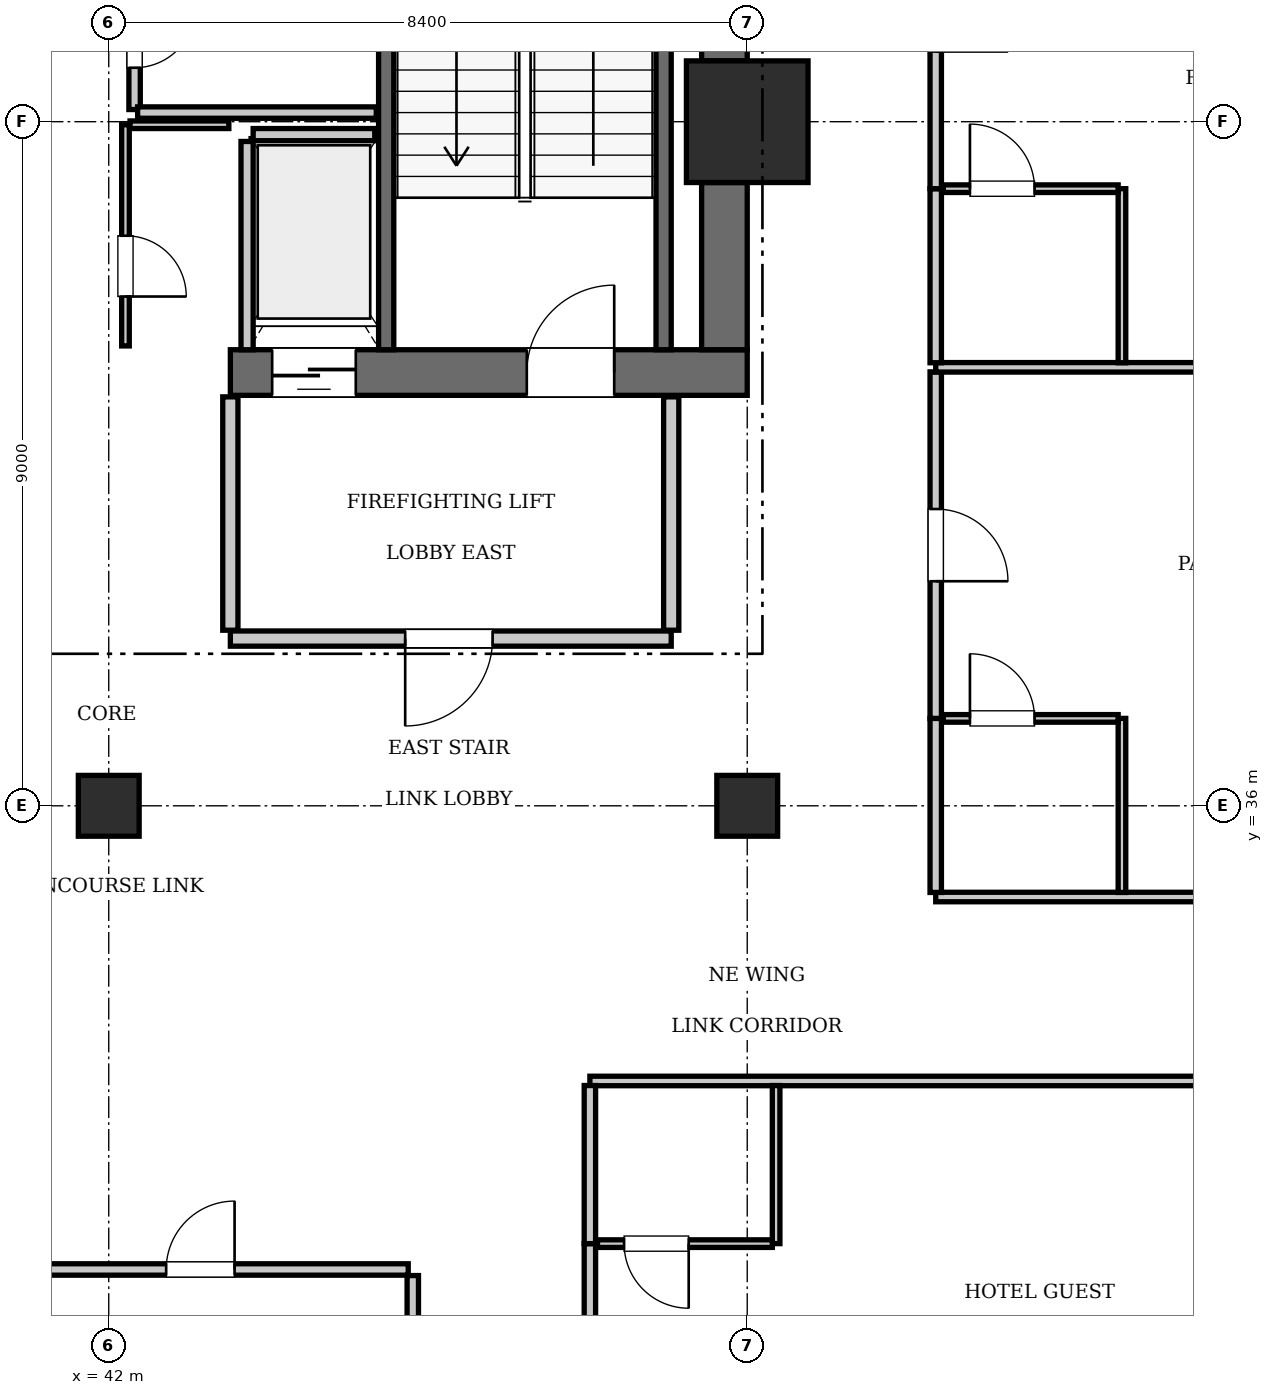
"""IFC4 building model, lengths in metres.
Left out: names, types, materials, properties, quantities, classifications, styles, units other than length and angle.
Written with IfcOpenShell. Run it as: python <this file> out.ifc"""

import sys

from ifc_helpers import new_model, si_unit, direction, frame, frame_2d, origin, origin_2d, place, context, subcontext, project, spatial, rectangle, extrude, element, fill, save


model = new_model("IFC4")
c1 = context("Model", 3, precision=1e-05, world=origin(), true_north=direction((0.0, 1.0)))
c2 = subcontext(c1, "Body", "Model", "MODEL_VIEW")
j1 = project(units=[si_unit("LENGTHUNIT", "METRE"), si_unit("PLANEANGLEUNIT", "RADIAN")], contexts=[c1])
p1 = place(None, origin())
s1 = spatial("IfcSite", under=j1, at=p1, CompositionType="ELEMENT")
p2 = place(p1, origin())
s2 = spatial("IfcBuilding", under=s1, at=p2, CompositionType="ELEMENT")
p3 = place(p2, frame((0.0, 0.0, 266.35)))
s3 = spatial("IfcBuildingStorey", under=s2, at=p3, CompositionType="ELEMENT", Elevation=266.35)
p4 = place(p3, frame((50.4, 45.0, 0.0), z_axis=(0.0, 0.0, 1.0), x_axis=(1.0, 0.0, 0.0)))
e1 = element("IfcColumn", 1, at=p4, inside=s3, PredefinedType="COLUMN", context=c2, shape_type="SweptSolid", body=[
    extrude(rectangle(XDim=1.6, YDim=1.6, at=origin_2d()), origin(), (0.0, 0.0, 1.0), 3.85),
])
p5 = place(p3, frame((43.6, 41.7, 0.0), z_axis=(0.0, 0.0, 1.0), x_axis=(1.0, 0.0, 0.0)))
e2 = element("IfcWall", 2, at=p5, inside=s3, PredefinedType="SHEAR", context=c2, shape_type="SweptSolid", body=[
    extrude(rectangle(XDim=6.8, YDim=0.6, at=frame_2d((3.4, 0.0))), origin(), (0.0, 0.0, 1.0), 3.85),
])
p6 = place(p5, frame((3.9, 0.0, 0.0)))
e3 = element("IfcOpeningElement", 3, at=p6, cuts=e2, PredefinedType="OPENING", context=c2, shape_type="SweptSolid", body=[
    extrude(rectangle(XDim=1.15, YDim=2.15, at=frame_2d((0.575, 1.075))), frame((0.0, 0.31, 0.0), z_axis=(0.0, -1.0, 0.0), x_axis=(1.0, 0.0, 0.0)), (0.0, 0.0, 1.0), 0.62),
])
p7 = place(p5, frame((0.55, 0.0, 0.0)))
e4 = element("IfcOpeningElement", 4, at=p7, cuts=e2, PredefinedType="OPENING", context=c2, shape_type="SweptSolid", body=[
    extrude(rectangle(XDim=1.1, YDim=2.2, at=frame_2d((0.55, 1.1))), frame((0.0, 0.31, 0.0), z_axis=(0.0, -1.0, 0.0), x_axis=(1.0, 0.0, 0.0)), (0.0, 0.0, 1.0), 0.62),
])
p8 = place(p3, frame((50.1, 42.0, 0.0), z_axis=(0.0, 0.0, 1.0), x_axis=(0.0, 1.0, 0.0)))
e5 = element("IfcWall", 5, at=p8, inside=s3, PredefinedType="SHEAR", context=c2, shape_type="SweptSolid", body=[
    extrude(rectangle(XDim=2.2, YDim=0.6, at=frame_2d((1.1, 0.0))), origin(), (0.0, 0.0, 1.0), 3.85),
])
p9 = place(p3, frame((50.1, 45.8, 0.0), z_axis=(0.0, 0.0, 1.0), x_axis=(0.0, 1.0, 0.0)))
e6 = element("IfcWall", 6, at=p9, inside=s3, PredefinedType="SHEAR", context=c2, shape_type="SweptSolid", body=[
    extrude(rectangle(XDim=7.6, YDim=0.6, at=frame_2d((3.8, 0.0))), origin(), (0.0, 0.0, 1.0), 3.85),
])
for number, where, z_axis, x_axis in (
    (7, (42.0, 36.0, 0.0), (0.0, 0.0, 1.0), (1.0, 0.0, 0.0)),
    (8, (50.4, 36.0, 0.0), (0.0, 0.0, 1.0), (1.0, 0.0, 0.0)),
):
    element("IfcColumn", number, at=place(p3, frame(where, z_axis=z_axis, x_axis=x_axis)), inside=s3, PredefinedType="COLUMN", context=c2, shape_type="SweptSolid", body=[
        extrude(rectangle(XDim=0.8, YDim=0.8, at=origin_2d()), origin(), (0.0, 0.0, 1.0), 3.85),
    ])
p10 = place(p3, frame((45.65, 42.0, 0.0), z_axis=(0.0, 0.0, 1.0), x_axis=(0.0, 1.0, 0.0)))
e9 = element("IfcWall", 9, at=p10, inside=s3, PredefinedType="SOLIDWALL", context=c2, shape_type="SweptSolid", body=[
    extrude(rectangle(XDim=9.15, YDim=0.2, at=frame_2d((4.575, 0.0))), origin(), (0.0, 0.0, 1.0), 3.61),
])
p11 = place(p3, frame((49.3, 42.0, 0.0), z_axis=(0.0, 0.0, 1.0), x_axis=(0.0, 1.0, 0.0)))
e10 = element("IfcWall", 10, at=p11, inside=s3, PredefinedType="SOLIDWALL", context=c2, shape_type="SweptSolid", body=[
    extrude(rectangle(XDim=9.12, YDim=0.2, at=frame_2d((4.56, 0.0))), origin(), (0.0, 0.0, 1.0), 3.61),
])
p12 = place(p3, frame((43.9, 44.83, 0.0), z_axis=(0.0, 0.0, 1.0), x_axis=(1.0, 0.0, 0.0)))
e11 = element("IfcWall", 11, at=p12, inside=s3, PredefinedType="SOLIDWALL", context=c2, shape_type="SweptSolid", body=[
    extrude(rectangle(XDim=1.6, YDim=0.16, at=frame_2d((0.8, 0.0))), origin(), (0.0, 0.0, 1.0), 3.61),
])
p13 = place(p3, frame((43.82, 42.0, 0.0), z_axis=(0.0, 0.0, 1.0), x_axis=(0.0, 1.0, 0.0)))
e12 = element("IfcWall", 12, at=p13, inside=s3, PredefinedType="SOLIDWALL", context=c2, shape_type="SweptSolid", body=[
    extrude(rectangle(XDim=2.74, YDim=0.16, at=frame_2d((1.37, 0.0))), origin(), (0.0, 0.0, 1.0), 3.61),
])
p14 = place(p3, frame((43.6, 38.2, 0.0), z_axis=(0.0, 0.0, 1.0), x_axis=(1.0, 0.0, 0.0)))
e13 = element("IfcWall", 13, at=p14, inside=s3, PredefinedType="PARTITIONING", context=c2, shape_type="SweptSolid", body=[
    extrude(rectangle(XDim=5.8, YDim=0.2, at=frame_2d((2.9, 0.0))), origin(), (0.0, 0.0, 1.0), 3.61),
])
p15 = place(p14, frame((2.3, 0.0, 0.0)))
e14 = element("IfcOpeningElement", 14, at=p15, cuts=e13, PredefinedType="OPENING", context=c2, shape_type="SweptSolid", body=[
    extrude(rectangle(XDim=1.15, YDim=2.15, at=frame_2d((0.575, 1.075))), frame((0.0, 0.11, 0.0), z_axis=(0.0, -1.0, 0.0), x_axis=(1.0, 0.0, 0.0)), (0.0, 0.0, 1.0), 0.22),
])
for number, where, z_axis, x_axis in (
    (15, (43.6, 38.31, 0.0), (0.0, 0.0, 1.0), (0.0, 1.0, 0.0)),
    (16, (49.4, 38.31, 0.0), (0.0, 0.0, 1.0), (0.0, 1.0, 0.0)),
):
    element("IfcWall", number, at=place(p3, frame(where, z_axis=z_axis, x_axis=x_axis)), inside=s3, PredefinedType="PARTITIONING", context=c2, shape_type="SweptSolid", body=[
        extrude(rectangle(XDim=3.07, YDim=0.2, at=frame_2d((1.535, 0.0))), origin(), (0.0, 0.0, 1.0), 3.61),
    ])
p16 = place(p3, frame((42.22, 42.05, 0.0), z_axis=(0.0, 0.0, 1.0), x_axis=(0.0, 1.0, 0.0)))
e17 = element("IfcWall", 17, at=p16, inside=s3, PredefinedType="PARTITIONING", context=c2, shape_type="SweptSolid", body=[
    extrude(rectangle(XDim=2.91, YDim=0.1, at=frame_2d((1.455, 0.0))), origin(), (0.0, 0.0, 1.0), 3.61),
])
p17 = place(p16, frame((0.65, 0.0, 0.0)))
e18 = element("IfcOpeningElement", 18, at=p17, cuts=e17, PredefinedType="OPENING", context=c2, shape_type="SweptSolid", body=[
    extrude(rectangle(XDim=0.8, YDim=2.05, at=frame_2d((0.4, 1.025))), frame((0.0, 0.06, 0.0), z_axis=(0.0, -1.0, 0.0), x_axis=(1.0, 0.0, 0.0)), (0.0, 0.0, 1.0), 0.12),
])
p18 = place(p3, frame((42.28, 44.96, 0.0), z_axis=(0.0, 0.0, 1.0), x_axis=(1.0, 0.0, 0.0)))
e19 = element("IfcWall", 19, at=p18, inside=s3, PredefinedType="PARTITIONING", context=c2, shape_type="SweptSolid", body=[
    extrude(rectangle(XDim=1.3, YDim=0.1, at=frame_2d((0.65, 0.0))), origin(), (0.0, 0.0, 1.0), 3.61),
])
p19 = place(p3, frame((42.34, 45.16, 0.0), z_axis=(0.0, 0.0, 1.0), x_axis=(0.0, 1.0, 0.0)))
e20 = element("IfcWall", 20, at=p19, inside=s3, PredefinedType="PARTITIONING", context=c2, shape_type="SweptSolid", body=[
    extrude(rectangle(XDim=2.38, YDim=0.15, at=frame_2d((1.19, 0.0))), origin(), (0.0, 0.0, 1.0), 3.61),
])
p20 = place(p19, frame((0.55, 0.0, 0.0)))
e21 = element("IfcOpeningElement", 21, at=p20, cuts=e20, PredefinedType="OPENING", context=c2, shape_type="SweptSolid", body=[
    extrude(rectangle(XDim=0.8, YDim=2.05, at=frame_2d((0.4, 1.025))), frame((0.0, 0.085, 0.0), z_axis=(0.0, -1.0, 0.0), x_axis=(1.0, 0.0, 0.0)), (0.0, 0.0, 1.0), 0.17),
])
p21 = place(p3, frame((42.38, 45.12, 0.0), z_axis=(0.0, 0.0, 1.0), x_axis=(1.0, 0.0, 0.0)))
e22 = element("IfcWall", 22, at=p21, inside=s3, PredefinedType="PARTITIONING", context=c2, shape_type="SweptSolid", body=[
    extrude(rectangle(XDim=3.14, YDim=0.15, at=frame_2d((1.57, 0.0))), origin(), (0.0, 0.0, 1.0), 3.61),
])
p22 = place(p3, frame((46.0, 20.53, 0.0), z_axis=(0.0, 0.0, 1.0), x_axis=(0.0, 1.0, 0.0)))
e23 = element("IfcWall", 23, at=p22, inside=s3, PredefinedType="PARTITIONING", context=c2, shape_type="SweptSolid", body=[
    extrude(rectangle(XDim=9.29, YDim=0.15, at=frame_2d((4.645, 0.0))), origin(), (0.0, 0.0, 1.0), 3.61),
])
p23 = place(p3, frame((40.471, 29.9, 0.0), z_axis=(0.0, 0.0, 1.0), x_axis=(1.0, 0.0, 0.0)))
e24 = element("IfcWall", 24, at=p23, inside=s3, PredefinedType="PARTITIONING", context=c2, shape_type="SweptSolid", body=[
    extrude(rectangle(XDim=5.469, YDim=0.15, at=frame_2d((2.734, 0.0))), origin(), (0.0, 0.0, 1.0), 3.61),
])
p24 = place(p23, frame((2.284, 0.0, 0.0)))
e25 = element("IfcOpeningElement", 25, at=p24, cuts=e24, PredefinedType="OPENING", context=c2, shape_type="SweptSolid", body=[
    extrude(rectangle(XDim=0.9, YDim=2.1, at=frame_2d((0.45, 1.05))), frame((0.0, 0.085, 0.0), z_axis=(0.0, -1.0, 0.0), x_axis=(1.0, 0.0, 0.0)), (0.0, 0.0, 1.0), 0.17),
])
p25 = place(p3, frame((48.33, 32.38, 0.0), z_axis=(0.0, 0.0, 1.0), x_axis=(1.0, 0.0, 0.0)))
e26 = element("IfcWall", 26, at=p25, inside=s3, PredefinedType="PARTITIONING", context=c2, shape_type="SweptSolid", body=[
    extrude(rectangle(XDim=11.77, YDim=0.125, at=frame_2d((5.885, 0.0))), origin(), (0.0, 0.0, 1.0), 3.61),
])
p26 = place(p3, frame((48.33, 26.5, 0.0), z_axis=(0.0, 0.0, 1.0), x_axis=(0.0, 1.0, 0.0)))
e27 = element("IfcWall", 27, at=p26, inside=s3, PredefinedType="PARTITIONING", context=c2, shape_type="SweptSolid", body=[
    extrude(rectangle(XDim=3.74, YDim=0.15, at=frame_2d((1.87, 0.0))), origin(), (0.0, 0.0, 1.0), 3.61),
])
p27 = place(p26, frame((1.635, 0.0, 0.0)))
e28 = element("IfcOpeningElement", 28, at=p27, cuts=e27, PredefinedType="OPENING", context=c2, shape_type="SweptSolid", body=[
    extrude(rectangle(XDim=0.95, YDim=2.15, at=frame_2d((0.475, 1.075))), frame((0.0, 0.085, 0.0), z_axis=(0.0, -1.0, 0.0), x_axis=(1.0, 0.0, 0.0)), (0.0, 0.0, 1.0), 0.17),
])
p28 = place(p3, frame((48.33, 30.24, 0.0), z_axis=(0.0, 0.0, 1.0), x_axis=(0.0, 1.0, 0.0)))
e29 = element("IfcWall", 29, at=p28, inside=s3, PredefinedType="PARTITIONING", context=c2, shape_type="SweptSolid", body=[
    extrude(rectangle(XDim=2.08, YDim=0.15, at=frame_2d((1.04, 0.0))), origin(), (0.0, 0.0, 1.0), 3.61),
])
p29 = place(p3, frame((50.78, 30.24, 0.0), z_axis=(0.0, 0.0, 1.0), x_axis=(0.0, 1.0, 0.0)))
e30 = element("IfcWall", 30, at=p29, inside=s3, PredefinedType="PARTITIONING", context=c2, shape_type="SweptSolid", body=[
    extrude(rectangle(XDim=2.08, YDim=0.1, at=frame_2d((1.04, 0.0))), origin(), (0.0, 0.0, 1.0), 3.61),
])
p30 = place(p3, frame((48.43, 30.24, 0.0), z_axis=(0.0, 0.0, 1.0), x_axis=(1.0, 0.0, 0.0)))
e31 = element("IfcWall", 31, at=p30, inside=s3, PredefinedType="PARTITIONING", context=c2, shape_type="SweptSolid", body=[
    extrude(rectangle(XDim=2.3, YDim=0.1, at=frame_2d((1.15, 0.0))), origin(), (0.0, 0.0, 1.0), 3.61),
])
p31 = place(p30, frame((0.35, 0.0, 0.0)))
e32 = element("IfcOpeningElement", 32, at=p31, cuts=e31, PredefinedType="OPENING", context=c2, shape_type="SweptSolid", body=[
    extrude(rectangle(XDim=0.85, YDim=2.1, at=frame_2d((0.425, 1.05))), frame((0.0, 0.06, 0.0), z_axis=(0.0, -1.0, 0.0), x_axis=(1.0, 0.0, 0.0)), (0.0, 0.0, 1.0), 0.12),
])
p32 = place(p3, frame((52.88, 34.8, 0.0), z_axis=(0.0, 0.0, 1.0), x_axis=(1.0, 0.0, 0.0)))
e33 = element("IfcWall", 33, at=p32, inside=s3, PredefinedType="PARTITIONING", context=c2, shape_type="SweptSolid", body=[
    extrude(rectangle(XDim=7.22, YDim=0.125, at=frame_2d((3.61, 0.0))), origin(), (0.0, 0.0, 1.0), 3.61),
])
p33 = place(p3, frame((52.88, 34.86, 0.0), z_axis=(0.0, 0.0, 1.0), x_axis=(0.0, 1.0, 0.0)))
e34 = element("IfcWall", 34, at=p33, inside=s3, PredefinedType="PARTITIONING", context=c2, shape_type="SweptSolid", body=[
    extrude(rectangle(XDim=2.29, YDim=0.15, at=frame_2d((1.145, 0.0))), origin(), (0.0, 0.0, 1.0), 3.61),
])
p34 = place(p3, frame((52.88, 37.15, 0.0), z_axis=(0.0, 0.0, 1.0), x_axis=(0.0, 1.0, 0.0)))
e35 = element("IfcWall", 35, at=p34, inside=s3, PredefinedType="PARTITIONING", context=c2, shape_type="SweptSolid", body=[
    extrude(rectangle(XDim=4.559, YDim=0.15, at=frame_2d((2.279, 0.0))), origin(), (0.0, 0.0, 1.0), 3.61),
])
p35 = place(p34, frame((1.804, 0.0, 0.0)))
e36 = element("IfcOpeningElement", 36, at=p35, cuts=e35, PredefinedType="OPENING", context=c2, shape_type="SweptSolid", body=[
    extrude(rectangle(XDim=0.95, YDim=2.15, at=frame_2d((0.475, 1.075))), frame((0.0, 0.085, 0.0), z_axis=(0.0, -1.0, 0.0), x_axis=(1.0, 0.0, 0.0)), (0.0, 0.0, 1.0), 0.17),
])
p36 = place(p3, frame((55.33, 34.86, 0.0), z_axis=(0.0, 0.0, 1.0), x_axis=(0.0, 1.0, 0.0)))
e37 = element("IfcWall", 37, at=p36, inside=s3, PredefinedType="PARTITIONING", context=c2, shape_type="SweptSolid", body=[
    extrude(rectangle(XDim=2.29, YDim=0.1, at=frame_2d((1.145, 0.0))), origin(), (0.0, 0.0, 1.0), 3.61),
])
p37 = place(p3, frame((52.98, 37.15, 0.0), z_axis=(0.0, 0.0, 1.0), x_axis=(1.0, 0.0, 0.0)))
e38 = element("IfcWall", 38, at=p37, inside=s3, PredefinedType="PARTITIONING", context=c2, shape_type="SweptSolid", body=[
    extrude(rectangle(XDim=2.3, YDim=0.1, at=frame_2d((1.15, 0.0))), origin(), (0.0, 0.0, 1.0), 3.61),
])
p38 = place(p37, frame((0.35, 0.0, 0.0)))
e39 = element("IfcOpeningElement", 39, at=p38, cuts=e38, PredefinedType="OPENING", context=c2, shape_type="SweptSolid", body=[
    extrude(rectangle(XDim=0.85, YDim=2.1, at=frame_2d((0.425, 1.05))), frame((0.0, 0.06, 0.0), z_axis=(0.0, -1.0, 0.0), x_axis=(1.0, 0.0, 0.0)), (0.0, 0.0, 1.0), 0.12),
])
p39 = place(p3, frame((52.88, 41.769, 0.0), z_axis=(0.0, 0.0, 1.0), x_axis=(1.0, 0.0, 0.0)))
e40 = element("IfcWall", 40, at=p39, inside=s3, PredefinedType="PARTITIONING", context=c2, shape_type="SweptSolid", body=[
    extrude(rectangle(XDim=7.22, YDim=0.125, at=frame_2d((3.61, 0.0))), origin(), (0.0, 0.0, 1.0), 3.61),
])
p40 = place(p3, frame((52.88, 41.829, 0.0), z_axis=(0.0, 0.0, 1.0), x_axis=(0.0, 1.0, 0.0)))
e41 = element("IfcWall", 41, at=p40, inside=s3, PredefinedType="PARTITIONING", context=c2, shape_type="SweptSolid", body=[
    extrude(rectangle(XDim=2.29, YDim=0.15, at=frame_2d((1.145, 0.0))), origin(), (0.0, 0.0, 1.0), 3.61),
])
p41 = place(p3, frame((52.88, 44.119, 0.0), z_axis=(0.0, 0.0, 1.0), x_axis=(0.0, 1.0, 0.0)))
e42 = element("IfcWall", 42, at=p41, inside=s3, PredefinedType="PARTITIONING", context=c2, shape_type="SweptSolid", body=[
    extrude(rectangle(XDim=4.559, YDim=0.15, at=frame_2d((2.279, 0.0))), origin(), (0.0, 0.0, 1.0), 3.61),
])
p42 = place(p41, frame((1.804, 0.0, 0.0)))
e43 = element("IfcOpeningElement", 43, at=p42, cuts=e42, PredefinedType="OPENING", context=c2, shape_type="SweptSolid", body=[
    extrude(rectangle(XDim=0.95, YDim=2.15, at=frame_2d((0.475, 1.075))), frame((0.0, 0.085, 0.0), z_axis=(0.0, -1.0, 0.0), x_axis=(1.0, 0.0, 0.0)), (0.0, 0.0, 1.0), 0.17),
])
p43 = place(p3, frame((55.33, 41.829, 0.0), z_axis=(0.0, 0.0, 1.0), x_axis=(0.0, 1.0, 0.0)))
e44 = element("IfcWall", 44, at=p43, inside=s3, PredefinedType="PARTITIONING", context=c2, shape_type="SweptSolid", body=[
    extrude(rectangle(XDim=2.29, YDim=0.1, at=frame_2d((1.145, 0.0))), origin(), (0.0, 0.0, 1.0), 3.61),
])
p44 = place(p3, frame((52.98, 44.119, 0.0), z_axis=(0.0, 0.0, 1.0), x_axis=(1.0, 0.0, 0.0)))
e45 = element("IfcWall", 45, at=p44, inside=s3, PredefinedType="PARTITIONING", context=c2, shape_type="SweptSolid", body=[
    extrude(rectangle(XDim=2.3, YDim=0.1, at=frame_2d((1.15, 0.0))), origin(), (0.0, 0.0, 1.0), 3.61),
])
p45 = place(p44, frame((0.35, 0.0, 0.0)))
e46 = element("IfcOpeningElement", 46, at=p45, cuts=e45, PredefinedType="OPENING", context=c2, shape_type="SweptSolid", body=[
    extrude(rectangle(XDim=0.85, YDim=2.1, at=frame_2d((0.425, 1.05))), frame((0.0, 0.06, 0.0), z_axis=(0.0, -1.0, 0.0), x_axis=(1.0, 0.0, 0.0)), (0.0, 0.0, 1.0), 0.12),
])
p46 = place(p6, origin())
e47 = element("IfcDoor", 47, at=p46, inside=s3, OperationType="SINGLE_SWING_RIGHT", PredefinedType="DOOR", context=c2, shape_type="SweptSolid", body=[
    extrude(rectangle(XDim=1.15, YDim=2.15, at=frame_2d((0.575, 1.075))), frame((0.0, 0.025, 0.0), z_axis=(0.0, -1.0, 0.0), x_axis=(1.0, 0.0, 0.0)), (0.0, 0.0, 1.0), 0.05),
])
fill(e3, e47)
p47 = place(p7, frame((1.1, 0.0, 0.0), z_axis=(0.0, 0.0, 1.0), x_axis=(-1.0, 0.0, 0.0)))
e48 = element("IfcDoor", 48, at=p47, inside=s3, OperationType="SLIDING_TO_LEFT", PredefinedType="DOOR", context=c2, shape_type="SweptSolid", body=[
    extrude(rectangle(XDim=1.1, YDim=2.2, at=frame_2d((0.55, 1.1))), frame((0.0, 0.025, 0.0), z_axis=(0.0, -1.0, 0.0), x_axis=(1.0, 0.0, 0.0)), (0.0, 0.0, 1.0), 0.05),
])
fill(e4, e48)
p48 = place(p15, frame((1.15, 0.0, 0.0), z_axis=(0.0, 0.0, 1.0), x_axis=(-1.0, 0.0, 0.0)))
e49 = element("IfcDoor", 49, at=p48, inside=s3, OperationType="SINGLE_SWING_RIGHT", PredefinedType="DOOR", context=c2, shape_type="SweptSolid", body=[
    extrude(rectangle(XDim=1.15, YDim=2.15, at=frame_2d((0.575, 1.075))), frame((0.0, 0.025, 0.0), z_axis=(0.0, -1.0, 0.0), x_axis=(1.0, 0.0, 0.0)), (0.0, 0.0, 1.0), 0.05),
])
fill(e14, e49)
p49 = place(p17, frame((0.8, 0.0, 0.0), z_axis=(0.0, 0.0, 1.0), x_axis=(-1.0, 0.0, 0.0)))
e50 = element("IfcDoor", 50, at=p49, inside=s3, OperationType="SINGLE_SWING_RIGHT", PredefinedType="DOOR", context=c2, shape_type="SweptSolid", body=[
    extrude(rectangle(XDim=0.8, YDim=2.05, at=frame_2d((0.4, 1.025))), frame((0.0, 0.025, 0.0), z_axis=(0.0, -1.0, 0.0), x_axis=(1.0, 0.0, 0.0)), (0.0, 0.0, 1.0), 0.05),
])
fill(e18, e50)
p50 = place(p20, frame((0.8, 0.0, 0.0), z_axis=(0.0, 0.0, 1.0), x_axis=(-1.0, 0.0, 0.0)))
e51 = element("IfcDoor", 51, at=p50, inside=s3, OperationType="SINGLE_SWING_LEFT", PredefinedType="DOOR", context=c2, shape_type="SweptSolid", body=[
    extrude(rectangle(XDim=0.8, YDim=2.05, at=frame_2d((0.4, 1.025))), frame((0.0, 0.025, 0.0), z_axis=(0.0, -1.0, 0.0), x_axis=(1.0, 0.0, 0.0)), (0.0, 0.0, 1.0), 0.05),
])
fill(e21, e51)
p51 = place(p24, origin())
e52 = element("IfcDoor", 52, at=p51, inside=s3, OperationType="SINGLE_SWING_RIGHT", PredefinedType="DOOR", context=c2, shape_type="SweptSolid", body=[
    extrude(rectangle(XDim=0.9, YDim=2.1, at=frame_2d((0.45, 1.05))), frame((0.0, 0.025, 0.0), z_axis=(0.0, -1.0, 0.0), x_axis=(1.0, 0.0, 0.0)), (0.0, 0.0, 1.0), 0.05),
])
fill(e25, e52)
p52 = place(p31, frame((0.85, 0.0, 0.0), z_axis=(0.0, 0.0, 1.0), x_axis=(-1.0, 0.0, 0.0)))
e53 = element("IfcDoor", 53, at=p52, inside=s3, OperationType="SINGLE_SWING_LEFT", PredefinedType="DOOR", context=c2, shape_type="SweptSolid", body=[
    extrude(rectangle(XDim=0.85, YDim=2.1, at=frame_2d((0.425, 1.05))), frame((0.0, 0.025, 0.0), z_axis=(0.0, -1.0, 0.0), x_axis=(1.0, 0.0, 0.0)), (0.0, 0.0, 1.0), 0.05),
])
fill(e32, e53)
p53 = place(p38, origin())
e54 = element("IfcDoor", 54, at=p53, inside=s3, OperationType="SINGLE_SWING_LEFT", PredefinedType="DOOR", context=c2, shape_type="SweptSolid", body=[
    extrude(rectangle(XDim=0.85, YDim=2.1, at=frame_2d((0.425, 1.05))), frame((0.0, 0.025, 0.0), z_axis=(0.0, -1.0, 0.0), x_axis=(1.0, 0.0, 0.0)), (0.0, 0.0, 1.0), 0.05),
])
fill(e39, e54)
p54 = place(p35, frame((0.95, 0.0, 0.0), z_axis=(0.0, 0.0, 1.0), x_axis=(-1.0, 0.0, 0.0)))
e55 = element("IfcDoor", 55, at=p54, inside=s3, OperationType="SINGLE_SWING_RIGHT", PredefinedType="DOOR", context=c2, shape_type="SweptSolid", body=[
    extrude(rectangle(XDim=0.95, YDim=2.15, at=frame_2d((0.475, 1.075))), frame((0.0, 0.025, 0.0), z_axis=(0.0, -1.0, 0.0), x_axis=(1.0, 0.0, 0.0)), (0.0, 0.0, 1.0), 0.05),
])
fill(e36, e55)
p55 = place(p45, origin())
e56 = element("IfcDoor", 56, at=p55, inside=s3, OperationType="SINGLE_SWING_LEFT", PredefinedType="DOOR", context=c2, shape_type="SweptSolid", body=[
    extrude(rectangle(XDim=0.85, YDim=2.1, at=frame_2d((0.425, 1.05))), frame((0.0, 0.025, 0.0), z_axis=(0.0, -1.0, 0.0), x_axis=(1.0, 0.0, 0.0)), (0.0, 0.0, 1.0), 0.05),
])
fill(e46, e56)
save(model, sys.argv[1])
